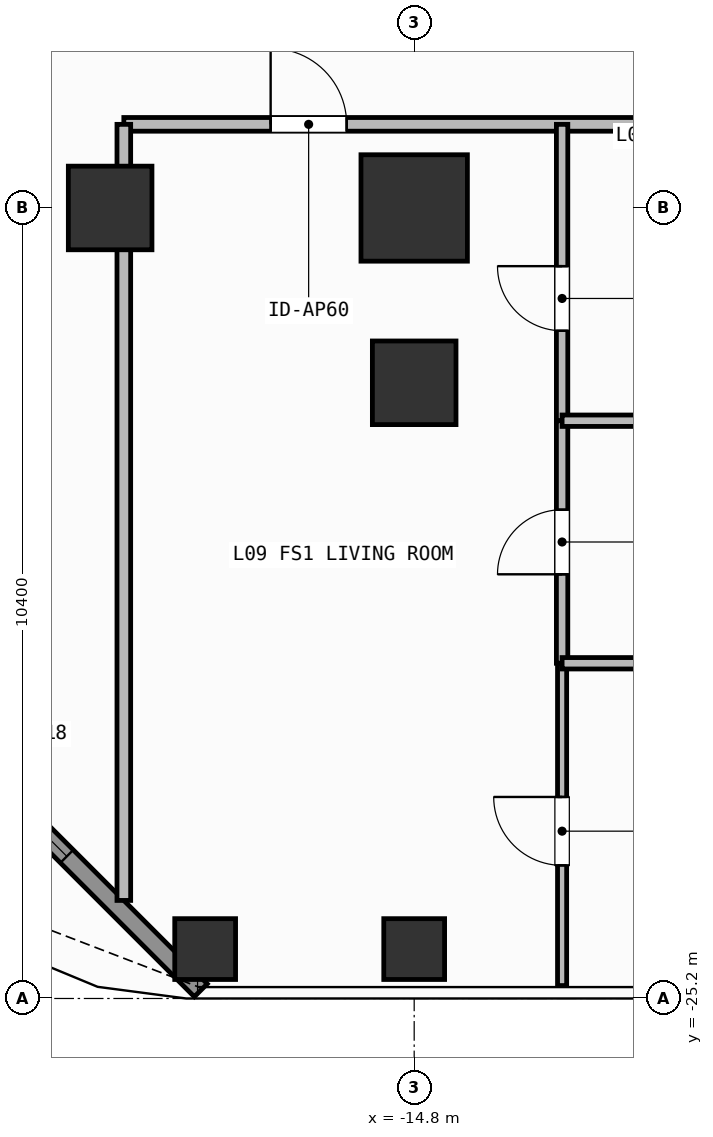
"""IFC4 building model, lengths in metres.
Left out: names, types, materials, properties, quantities, classifications, styles, units other than length and angle.
Written with IfcOpenShell. Run it as: python <this file> out.ifc"""

import sys

from ifc_helpers import new_model, si_unit, direction, frame, frame_2d, origin, origin_2d, place, context, subcontext, project, spatial, rectangle, hollow_rectangle, extrude, element, fill, save


model = new_model("IFC4")
c1 = context("Model", 3, precision=1e-05, world=origin(), true_north=direction((0.0, 1.0)))
c2 = subcontext(c1, "Body", "Model", "MODEL_VIEW")
j1 = project(units=[si_unit("LENGTHUNIT", "METRE"), si_unit("PLANEANGLEUNIT", "RADIAN")], contexts=[c1])
p1 = place(None, origin())
s1 = spatial("IfcSite", under=j1, at=p1, CompositionType="ELEMENT")
p2 = place(p1, origin())
s2 = spatial("IfcBuilding", under=s1, at=p2, CompositionType="ELEMENT")
p3 = place(p2, frame((0.0, 0.0, 34.5)))
s3 = spatial("IfcBuildingStorey", under=s2, at=p3, CompositionType="ELEMENT", Elevation=34.5)
p4 = place(p3, frame((-14.8, -14.8, 0.0), z_axis=(0.0, 0.0, 1.0), x_axis=(1.0, 0.0, 0.0)))
e1 = element("IfcColumn", 1, at=p4, inside=s3, PredefinedType="COLUMN", context=c2, shape_type="SweptSolid", body=[
    extrude(rectangle(XDim=1.4, YDim=1.4, at=origin_2d()), origin(), (0.0, 0.0, 1.0), 3.9),
])
for number, where, z_axis, x_axis in (
    (2, (-18.8, -14.8, 0.0), (0.0, 0.0, 1.0), (1.0, 0.0, 0.0)),
    (3, (-14.8, -17.1, 0.0), (0.0, 0.0, 1.0), (1.0, 0.0, 0.0)),
):
    element("IfcColumn", number, at=place(p3, frame(where, z_axis=z_axis, x_axis=x_axis)), inside=s3, PredefinedType="COLUMN", context=c2, shape_type="SweptSolid", body=[
        extrude(rectangle(XDim=1.1, YDim=1.1, at=origin_2d()), origin(), (0.0, 0.0, 1.0), 3.9),
    ])
for number, where, z_axis, x_axis in (
    (4, (-17.55, -24.55, 0.0), (0.0, 0.0, 1.0), (1.0, 0.0, 0.0)),
    (5, (-14.8, -24.55, 0.0), (0.0, 0.0, 1.0), (1.0, 0.0, 0.0)),
):
    element("IfcColumn", number, at=place(p3, frame(where, z_axis=z_axis, x_axis=x_axis)), inside=s3, PredefinedType="COLUMN", context=c2, shape_type="SweptSolid", body=[
        extrude(hollow_rectangle(XDim=0.8, YDim=0.8, WallThickness=0.036, at=origin_2d()), origin(), (0.0, 0.0, 1.0), 3.9),
    ])
p5 = place(p3, frame((-17.608, -25.092, 0.0), z_axis=(0.0, 0.0, 1.0), x_axis=(-0.707106781187, 0.707106781187, 0.0)))
e6 = element("IfcWall", 6, at=p5, inside=s3, PredefinedType="SOLIDWALL", context=c2, shape_type="SweptSolid", body=[
    extrude(rectangle(XDim=6.484, YDim=0.24, at=frame_2d((3.242, 0.0))), origin(), (0.0, 0.0, 1.0), 3.68),
])
p6 = place(p5, frame((2.492, 0.0, 0.8)))
e7 = element("IfcOpeningElement", 7, at=p6, cuts=e6, PredefinedType="OPENING", context=c2, shape_type="SweptSolid", body=[
    extrude(rectangle(XDim=1.5, YDim=1.85, at=frame_2d((0.75, 0.925))), frame((0.0, 0.13, 0.0), z_axis=(0.0, -1.0, 0.0), x_axis=(1.0, 0.0, 0.0)), (0.0, 0.0, 1.0), 0.26),
])
p7 = place(p3, frame((-18.62, -13.7, 0.0), z_axis=(0.0, 0.0, 1.0), x_axis=(1.0, 0.0, 0.0)))
e8 = element("IfcWall", 8, at=p7, inside=s3, PredefinedType="PARTITIONING", context=c2, shape_type="SweptSolid", body=[
    extrude(rectangle(XDim=9.469, YDim=0.18, at=frame_2d((4.735, 0.0))), origin(), (0.0, 0.0, 1.0), 3.68),
])
p8 = place(p7, frame((1.931, 0.0, 0.0)))
e9 = element("IfcOpeningElement", 9, at=p8, cuts=e8, PredefinedType="OPENING", context=c2, shape_type="SweptSolid", body=[
    extrude(rectangle(XDim=1.0, YDim=2.2, at=frame_2d((0.5, 1.1))), frame((0.0, 0.1, 0.0), z_axis=(0.0, -1.0, 0.0), x_axis=(1.0, 0.0, 0.0)), (0.0, 0.0, 1.0), 0.2),
])
p9 = place(p3, frame((-12.854, -17.599, 0.0), z_axis=(0.0, 0.0, 1.0), x_axis=(0.0, 1.0, 0.0)))
e10 = element("IfcWall", 10, at=p9, inside=s3, PredefinedType="PARTITIONING", context=c2, shape_type="SweptSolid", body=[
    extrude(rectangle(XDim=3.899, YDim=0.15, at=frame_2d((1.95, 0.0))), origin(), (0.0, 0.0, 1.0), 3.68),
])
p10 = place(p9, frame((1.183, 0.0, 0.0)))
e11 = element("IfcOpeningElement", 11, at=p10, cuts=e10, PredefinedType="OPENING", context=c2, shape_type="SweptSolid", body=[
    extrude(rectangle(XDim=0.85, YDim=2.1, at=frame_2d((0.425, 1.05))), frame((0.0, 0.085, 0.0), z_axis=(0.0, -1.0, 0.0), x_axis=(1.0, 0.0, 0.0)), (0.0, 0.0, 1.0), 0.17),
])
p11 = place(p3, frame((-12.854, -20.79, 0.0), z_axis=(0.0, 0.0, 1.0), x_axis=(0.0, 1.0, 0.0)))
e12 = element("IfcWall", 12, at=p11, inside=s3, PredefinedType="PARTITIONING", context=c2, shape_type="SweptSolid", body=[
    extrude(rectangle(XDim=3.191, YDim=0.15, at=frame_2d((1.595, 0.0))), origin(), (0.0, 0.0, 1.0), 3.68),
])
p12 = place(p11, frame((1.17, 0.0, 0.0)))
e13 = element("IfcOpeningElement", 13, at=p12, cuts=e12, PredefinedType="OPENING", context=c2, shape_type="SweptSolid", body=[
    extrude(rectangle(XDim=0.85, YDim=2.1, at=frame_2d((0.425, 1.05))), frame((0.0, 0.085, 0.0), z_axis=(0.0, -1.0, 0.0), x_axis=(1.0, 0.0, 0.0)), (0.0, 0.0, 1.0), 0.17),
])
p13 = place(p3, frame((-12.854, -25.03, 0.0), z_axis=(0.0, 0.0, 1.0), x_axis=(0.0, 1.0, 0.0)))
e14 = element("IfcWall", 14, at=p13, inside=s3, PredefinedType="PARTITIONING", context=c2, shape_type="SweptSolid", body=[
    extrude(rectangle(XDim=4.24, YDim=0.12, at=frame_2d((2.12, 0.0))), origin(), (0.0, 0.0, 1.0), 3.68),
])
p14 = place(p13, frame((1.581, 0.0, 0.0)))
e15 = element("IfcOpeningElement", 15, at=p14, cuts=e14, PredefinedType="OPENING", context=c2, shape_type="SweptSolid", body=[
    extrude(rectangle(XDim=0.9, YDim=2.1, at=frame_2d((0.45, 1.05))), frame((0.0, 0.07, 0.0), z_axis=(0.0, -1.0, 0.0), x_axis=(1.0, 0.0, 0.0)), (0.0, 0.0, 1.0), 0.14),
])
p15 = place(p3, frame((-18.62, -23.91, 0.0), z_axis=(0.0, 0.0, 1.0), x_axis=(0.0, 1.0, 0.0)))
e16 = element("IfcWall", 16, at=p15, inside=s3, PredefinedType="PARTITIONING", context=c2, shape_type="SweptSolid", body=[
    extrude(rectangle(XDim=10.21, YDim=0.18, at=frame_2d((5.105, 0.0))), origin(), (0.0, 0.0, 1.0), 3.082),
])
for number, where, z_axis, x_axis in (
    (17, (-12.854, -17.599, 0.0), (0.0, 0.0, 1.0), (1.0, 0.0, 0.0)),
    (18, (-12.854, -20.79, 0.0), (0.0, 0.0, 1.0), (1.0, 0.0, 0.0)),
):
    element("IfcWall", number, at=place(p3, frame(where, z_axis=z_axis, x_axis=x_axis)), inside=s3, PredefinedType="PARTITIONING", context=c2, shape_type="SweptSolid", body=[
        extrude(rectangle(XDim=3.703, YDim=0.15, at=frame_2d((1.852, 0.0))), origin(), (0.0, 0.0, 1.0), 3.68),
    ])
p16 = place(p6, origin())
e19 = element("IfcWindow", 19, at=p16, inside=s3, PartitioningType="SINGLE_PANEL", PredefinedType="WINDOW", context=c2, shape_type="SweptSolid", body=[
    extrude(rectangle(XDim=1.5, YDim=1.85, at=frame_2d((0.75, 0.925))), frame((0.0, 0.03, 0.0), z_axis=(0.0, -1.0, 0.0), x_axis=(1.0, 0.0, 0.0)), (0.0, 0.0, 1.0), 0.06),
])
fill(e7, e19)
p17 = place(p8, origin())
e20 = element("IfcDoor", 20, at=p17, inside=s3, OperationType="SINGLE_SWING_LEFT", PredefinedType="DOOR", context=c2, shape_type="SweptSolid", body=[
    extrude(rectangle(XDim=1.0, YDim=2.2, at=frame_2d((0.5, 1.1))), frame((0.0, 0.025, 0.0), z_axis=(0.0, -1.0, 0.0), x_axis=(1.0, 0.0, 0.0)), (0.0, 0.0, 1.0), 0.05),
])
fill(e9, e20)
p18 = place(p10, origin())
e21 = element("IfcDoor", 21, at=p18, inside=s3, OperationType="SINGLE_SWING_RIGHT", PredefinedType="DOOR", context=c2, shape_type="SweptSolid", body=[
    extrude(rectangle(XDim=0.85, YDim=2.1, at=frame_2d((0.425, 1.05))), frame((0.0, 0.025, 0.0), z_axis=(0.0, -1.0, 0.0), x_axis=(1.0, 0.0, 0.0)), (0.0, 0.0, 1.0), 0.05),
])
fill(e11, e21)
p19 = place(p12, origin())
e22 = element("IfcDoor", 22, at=p19, inside=s3, OperationType="SINGLE_SWING_LEFT", PredefinedType="DOOR", context=c2, shape_type="SweptSolid", body=[
    extrude(rectangle(XDim=0.85, YDim=2.1, at=frame_2d((0.425, 1.05))), frame((0.0, 0.025, 0.0), z_axis=(0.0, -1.0, 0.0), x_axis=(1.0, 0.0, 0.0)), (0.0, 0.0, 1.0), 0.05),
])
fill(e13, e22)
p20 = place(p14, origin())
e23 = element("IfcDoor", 23, at=p20, inside=s3, OperationType="SINGLE_SWING_RIGHT", PredefinedType="DOOR", context=c2, shape_type="SweptSolid", body=[
    extrude(rectangle(XDim=0.9, YDim=2.1, at=frame_2d((0.45, 1.05))), frame((0.0, 0.025, 0.0), z_axis=(0.0, -1.0, 0.0), x_axis=(1.0, 0.0, 0.0)), (0.0, 0.0, 1.0), 0.05),
])
fill(e15, e23)
save(model, sys.argv[1])
